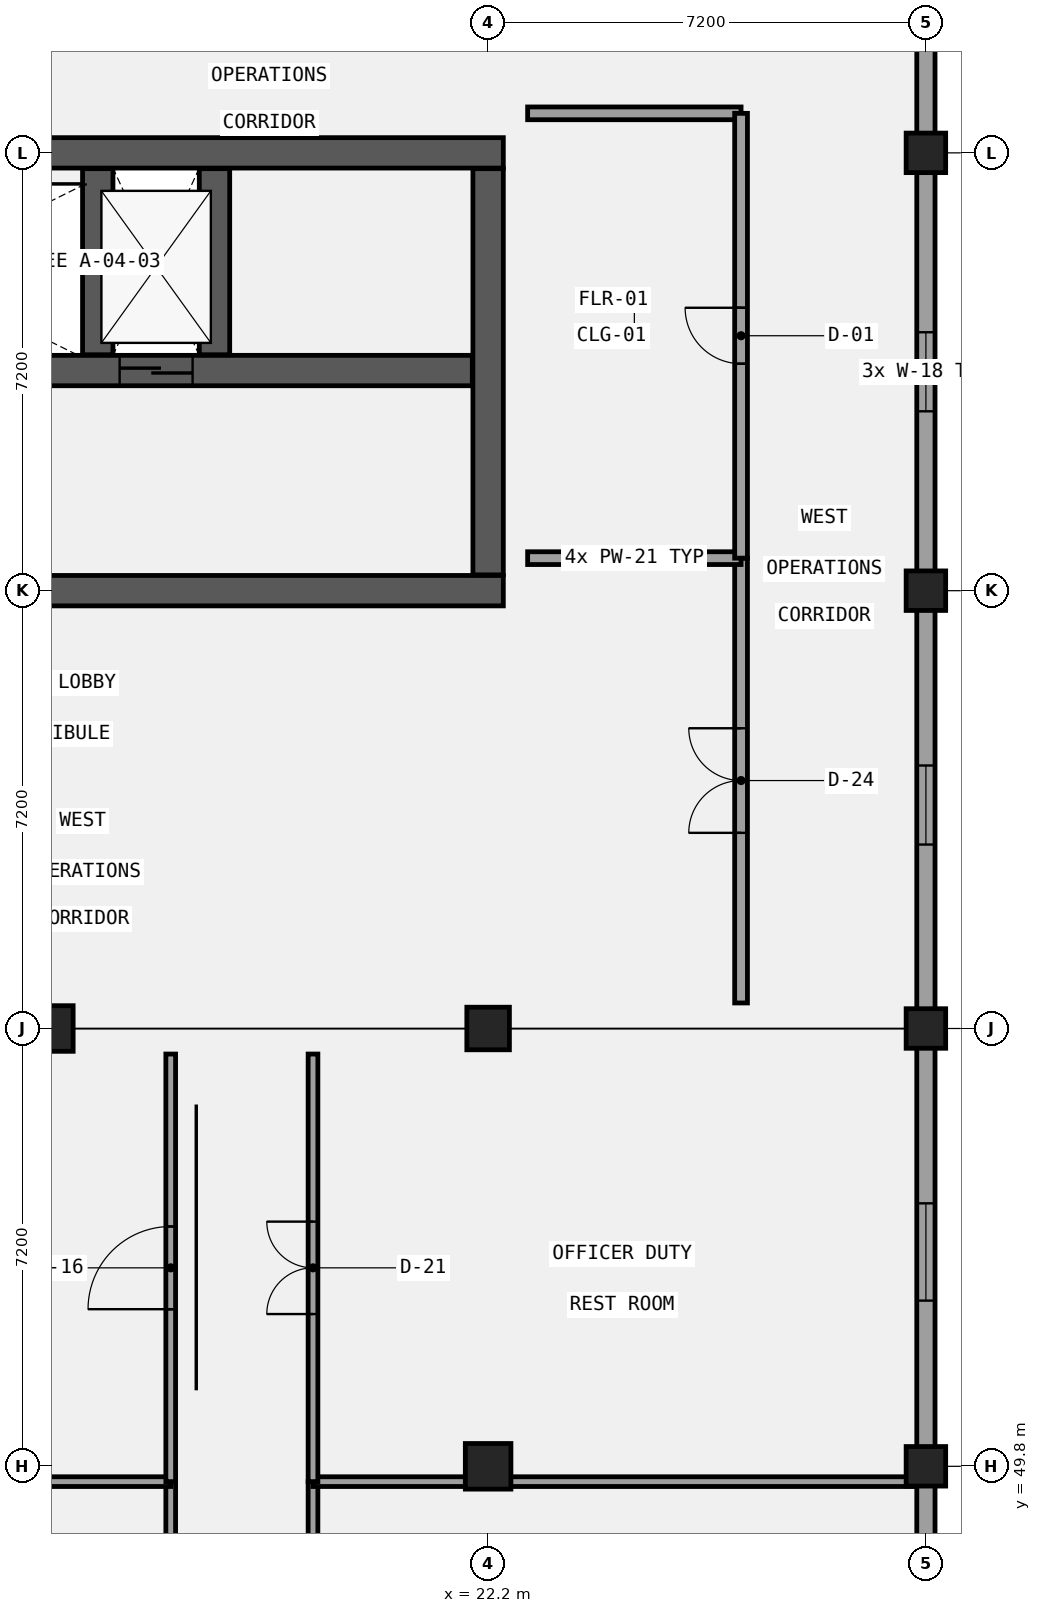
"""IFC4 building model, lengths in metres.
Left out: names, types, materials, properties, quantities, classifications, styles, units other than length and angle.
Written with IfcOpenShell. Run it as: python <this file> out.ifc"""

import sys

from ifc_helpers import new_model, si_unit, direction, frame, frame_2d, origin, origin_2d, place, context, subcontext, project, spatial, rectangle, circle, extrude, element, fill, save


model = new_model("IFC4")
c1 = context("Model", 3, precision=1e-05, world=origin(), true_north=direction((0.0, 1.0)))
c2 = subcontext(c1, "Body", "Model", "MODEL_VIEW")
j1 = project(units=[si_unit("LENGTHUNIT", "METRE"), si_unit("PLANEANGLEUNIT", "RADIAN")], contexts=[c1])
p1 = place(None, origin())
s1 = spatial("IfcSite", under=j1, at=p1, CompositionType="ELEMENT")
p2 = place(p1, origin())
s2 = spatial("IfcBuilding", under=s1, at=p2, CompositionType="ELEMENT")
p3 = place(p2, frame((0.0, 0.0, 5.4)))
s3 = spatial("IfcBuildingStorey", under=s2, at=p3, CompositionType="ELEMENT", Elevation=5.4)
p4 = place(p3, frame((7.55, 71.4, 0.0), z_axis=(0.0, 0.0, 1.0), x_axis=(1.0, 0.0, 0.0)))
e1 = element("IfcWall", 1, at=p4, inside=s3, PredefinedType="SHEAR", context=c2, shape_type="SweptSolid", body=[
    extrude(rectangle(XDim=14.9, YDim=0.5, at=frame_2d((7.45, 0.0))), origin(), (0.0, 0.0, 1.0), 4.2),
])
p5 = place(p3, frame((7.55, 64.2, 0.0), z_axis=(0.0, 0.0, 1.0), x_axis=(1.0, 0.0, 0.0)))
e2 = element("IfcWall", 2, at=p5, inside=s3, PredefinedType="SHEAR", context=c2, shape_type="SweptSolid", body=[
    extrude(rectangle(XDim=14.9, YDim=0.5, at=frame_2d((7.45, 0.0))), origin(), (0.0, 0.0, 1.0), 4.2),
])
p6 = place(p5, frame((3.8, 0.0, 0.0)))
e3 = element("IfcOpeningElement", 3, at=p6, cuts=e2, PredefinedType="OPENING", context=c2, shape_type="SweptSolid", body=[
    extrude(rectangle(XDim=1.3, YDim=2.2, at=frame_2d((0.65, 1.1))), frame((0.0, 0.26, 0.0), z_axis=(0.0, -1.0, 0.0), x_axis=(1.0, 0.0, 0.0)), (0.0, 0.0, 1.0), 0.52),
])
p7 = place(p3, frame((22.2, 64.46, 0.0), z_axis=(0.0, 0.0, 1.0), x_axis=(0.0, 1.0, 0.0)))
e4 = element("IfcWall", 4, at=p7, inside=s3, PredefinedType="SHEAR", context=c2, shape_type="SweptSolid", body=[
    extrude(rectangle(XDim=6.68, YDim=0.5, at=frame_2d((3.34, 0.0))), origin(), (0.0, 0.0, 1.0), 4.2),
])
p8 = place(p3, frame((8.06, 67.82, 0.0), z_axis=(0.0, 0.0, 1.0), x_axis=(1.0, 0.0, 0.0)))
e5 = element("IfcWall", 5, at=p8, inside=s3, PredefinedType="SHEAR", context=c2, shape_type="SweptSolid", body=[
    extrude(rectangle(XDim=13.88, YDim=0.5, at=frame_2d((6.94, 0.0))), origin(), (0.0, 0.0, 1.0), 4.2),
])
p9 = place(p8, frame((8.08, 0.0, 0.0)))
e6 = element("IfcOpeningElement", 6, at=p9, cuts=e5, PredefinedType="OPENING", context=c2, shape_type="SweptSolid", body=[
    extrude(rectangle(XDim=1.2, YDim=2.15, at=frame_2d((0.6, 1.075))), frame((0.0, 0.26, 0.0), z_axis=(0.0, -1.0, 0.0), x_axis=(1.0, 0.0, 0.0)), (0.0, 0.0, 1.0), 0.52),
])
p10 = place(p8, frame((0.315, 0.0, 0.0)))
e7 = element("IfcOpeningElement", 7, at=p10, cuts=e5, PredefinedType="OPENING", context=c2, shape_type="SweptSolid", body=[
    extrude(rectangle(XDim=1.15, YDim=2.15, at=frame_2d((0.575, 1.075))), frame((0.0, 0.26, 0.0), z_axis=(0.0, -1.0, 0.0), x_axis=(1.0, 0.0, 0.0)), (0.0, 0.0, 1.0), 0.52),
])
for number, where, z_axis, x_axis in (
    (8, (15.78, 68.08, 0.0), (0.0, 0.0, 1.0), (0.0, 1.0, 0.0)),
    (9, (17.7, 68.08, 0.0), (0.0, 0.0, 1.0), (0.0, 1.0, 0.0)),
):
    element("IfcWall", number, at=place(p3, frame(where, z_axis=z_axis, x_axis=x_axis)), inside=s3, PredefinedType="SHEAR", context=c2, shape_type="SweptSolid", body=[
        extrude(rectangle(XDim=3.06, YDim=0.5, at=frame_2d((1.53, 0.0))), origin(), (0.0, 0.0, 1.0), 4.2),
    ])
for number, where, z_axis, x_axis in (
    (10, (15.0, 57.0, 0.0), (0.0, 0.0, 1.0), (1.0, 0.0, 0.0)),
    (11, (22.2, 49.8, 0.0), (0.0, 0.0, 1.0), (1.0, 0.0, 0.0)),
):
    element("IfcColumn", number, at=place(p3, frame(where, z_axis=z_axis, x_axis=x_axis)), inside=s3, PredefinedType="COLUMN", context=c2, shape_type="SweptSolid", body=[
        extrude(rectangle(XDim=0.75, YDim=0.75, at=origin_2d()), origin(), (0.0, 0.0, 1.0), 4.2),
    ])
p11 = place(p3, frame((22.2, 57.0, 0.0), z_axis=(0.0, 0.0, 1.0), x_axis=(1.0, 0.0, 0.0)))
e12 = element("IfcColumn", 12, at=p11, inside=s3, PredefinedType="COLUMN", context=c2, shape_type="SweptSolid", body=[
    extrude(rectangle(XDim=0.7, YDim=0.7, at=origin_2d()), origin(), (0.0, 0.0, 1.0), 4.2),
])
for number, where, z_axis, x_axis in (
    (13, (29.4, 49.8, 0.0), (0.0, 0.0, 1.0), (1.0, 0.0, 0.0)),
    (14, (29.4, 57.0, 0.0), (0.0, 0.0, 1.0), (1.0, 0.0, 0.0)),
    (15, (29.4, 64.2, 0.0), (0.0, 0.0, 1.0), (1.0, 0.0, 0.0)),
    (16, (29.4, 71.4, 0.0), (0.0, 0.0, 1.0), (1.0, 0.0, 0.0)),
):
    element("IfcColumn", number, at=place(p3, frame(where, z_axis=z_axis, x_axis=x_axis)), inside=s3, PredefinedType="COLUMN", context=c2, shape_type="SweptSolid", body=[
        extrude(circle(Radius=0.325, at=origin_2d()), origin(), (0.0, 0.0, 1.0), 4.2),
    ])
p12 = place(p3, frame((29.4, 35.55, 0.0), z_axis=(0.0, 0.0, 1.0), x_axis=(0.0, 1.0, 0.0)))
e17 = element("IfcWall", 17, at=p12, inside=s3, PredefinedType="SOLIDWALL", context=c2, shape_type="SweptSolid", body=[
    extrude(rectangle(XDim=21.3, YDim=0.3, at=frame_2d((10.65, 0.0))), origin(), (0.0, 0.0, 1.0), 2.92),
])
p13 = place(p12, frame((2.725, 0.0, 1.0)))
e18 = element("IfcOpeningElement", 18, at=p13, cuts=e17, PredefinedType="OPENING", context=c2, shape_type="SweptSolid", body=[
    extrude(rectangle(XDim=1.6, YDim=1.4, at=frame_2d((0.8, 0.7))), frame((0.0, 0.16, 0.0), z_axis=(0.0, -1.0, 0.0), x_axis=(1.0, 0.0, 0.0)), (0.0, 0.0, 1.0), 0.32),
])
p14 = place(p12, frame((9.85, 0.0, 1.0)))
e19 = element("IfcOpeningElement", 19, at=p14, cuts=e17, PredefinedType="OPENING", context=c2, shape_type="SweptSolid", body=[
    extrude(rectangle(XDim=1.6, YDim=1.4, at=frame_2d((0.8, 0.7))), frame((0.0, 0.16, 0.0), z_axis=(0.0, -1.0, 0.0), x_axis=(1.0, 0.0, 0.0)), (0.0, 0.0, 1.0), 0.32),
])
p15 = place(p12, frame((16.975, 0.0, 1.0)))
e20 = element("IfcOpeningElement", 20, at=p15, cuts=e17, PredefinedType="OPENING", context=c2, shape_type="SweptSolid", body=[
    extrude(rectangle(XDim=1.6, YDim=1.4, at=frame_2d((0.8, 0.7))), frame((0.0, 0.16, 0.0), z_axis=(0.0, -1.0, 0.0), x_axis=(1.0, 0.0, 0.0)), (0.0, 0.0, 1.0), 0.32),
])
p16 = place(p3, frame((29.4, 57.15, 0.0), z_axis=(0.0, 0.0, 1.0), x_axis=(0.0, 1.0, 0.0)))
e21 = element("IfcWall", 21, at=p16, inside=s3, PredefinedType="SOLIDWALL", context=c2, shape_type="SweptSolid", body=[
    extrude(rectangle(XDim=21.3, YDim=0.3, at=frame_2d((10.65, 0.0))), origin(), (0.0, 0.0, 1.0), 3.27),
])
p17 = place(p16, frame((2.875, 0.0, 1.0)))
e22 = element("IfcOpeningElement", 22, at=p17, cuts=e21, PredefinedType="OPENING", context=c2, shape_type="SweptSolid", body=[
    extrude(rectangle(XDim=1.3, YDim=1.9, at=frame_2d((0.65, 0.95))), frame((0.0, 0.16, 0.0), z_axis=(0.0, -1.0, 0.0), x_axis=(1.0, 0.0, 0.0)), (0.0, 0.0, 1.0), 0.32),
])
p18 = place(p16, frame((10.0, 0.0, 1.0)))
e23 = element("IfcOpeningElement", 23, at=p18, cuts=e21, PredefinedType="OPENING", context=c2, shape_type="SweptSolid", body=[
    extrude(rectangle(XDim=1.3, YDim=1.9, at=frame_2d((0.65, 0.95))), frame((0.0, 0.16, 0.0), z_axis=(0.0, -1.0, 0.0), x_axis=(1.0, 0.0, 0.0)), (0.0, 0.0, 1.0), 0.32),
])
p19 = place(p16, frame((17.125, 0.0, 1.0)))
e24 = element("IfcOpeningElement", 24, at=p19, cuts=e21, PredefinedType="OPENING", context=c2, shape_type="SweptSolid", body=[
    extrude(rectangle(XDim=1.3, YDim=1.9, at=frame_2d((0.65, 0.95))), frame((0.0, 0.16, 0.0), z_axis=(0.0, -1.0, 0.0), x_axis=(1.0, 0.0, 0.0)), (0.0, 0.0, 1.0), 0.32),
])
p20 = place(p3, frame((16.98, 42.516, 0.0), z_axis=(0.0, 0.0, 1.0), x_axis=(0.0, 1.0, 0.0)))
e25 = element("IfcWall", 25, at=p20, inside=s3, PredefinedType="PARTITIONING", context=c2, shape_type="SweptSolid", body=[
    extrude(rectangle(XDim=7.032, YDim=0.16, at=frame_2d((3.516, 0.0))), origin(), (0.0, 0.0, 1.0), 3.92),
])
p21 = place(p20, frame((2.906, 0.0, 0.0)))
e26 = element("IfcOpeningElement", 26, at=p21, cuts=e25, PredefinedType="OPENING", context=c2, shape_type="SweptSolid", body=[
    extrude(rectangle(XDim=1.22, YDim=2.35, at=frame_2d((0.61, 1.175))), frame((0.0, 0.09, 0.0), z_axis=(0.0, -1.0, 0.0), x_axis=(1.0, 0.0, 0.0)), (0.0, 0.0, 1.0), 0.18),
])
p22 = place(p3, frame((7.98, 49.548, 0.0), z_axis=(0.0, 0.0, 1.0), x_axis=(1.0, 0.0, 0.0)))
e27 = element("IfcWall", 27, at=p22, inside=s3, PredefinedType="PARTITIONING", context=c2, shape_type="SweptSolid", body=[
    extrude(rectangle(XDim=9.0, YDim=0.16, at=frame_2d((4.5, 0.0))), origin(), (0.0, 0.0, 1.0), 2.72),
])
p23 = place(p3, frame((16.98, 49.548, 0.0), z_axis=(0.0, 0.0, 1.0), x_axis=(0.0, 1.0, 0.0)))
e28 = element("IfcWall", 28, at=p23, inside=s3, PredefinedType="PARTITIONING", context=c2, shape_type="SweptSolid", body=[
    extrude(rectangle(XDim=7.032, YDim=0.16, at=frame_2d((3.516, 0.0))), origin(), (0.0, 0.0, 1.0), 3.92),
])
p24 = place(p23, frame((2.836, 0.0, 0.0)))
e29 = element("IfcOpeningElement", 29, at=p24, cuts=e28, PredefinedType="OPENING", context=c2, shape_type="SweptSolid", body=[
    extrude(rectangle(XDim=1.36, YDim=2.1, at=frame_2d((0.68, 1.05))), frame((0.0, 0.09, 0.0), z_axis=(0.0, -1.0, 0.0), x_axis=(1.0, 0.0, 0.0)), (0.0, 0.0, 1.0), 0.18),
])
p25 = place(p3, frame((19.32, 42.516, 0.0), z_axis=(0.0, 0.0, 1.0), x_axis=(0.0, 1.0, 0.0)))
e30 = element("IfcWall", 30, at=p25, inside=s3, PredefinedType="PARTITIONING", context=c2, shape_type="SweptSolid", body=[
    extrude(rectangle(XDim=7.032, YDim=0.16, at=frame_2d((3.516, 0.0))), origin(), (0.0, 0.0, 1.0), 3.92),
])
p26 = place(p25, frame((2.756, 0.0, 0.0)))
e31 = element("IfcOpeningElement", 31, at=p26, cuts=e30, PredefinedType="OPENING", context=c2, shape_type="SweptSolid", body=[
    extrude(rectangle(XDim=1.52, YDim=2.22, at=frame_2d((0.76, 1.11))), frame((0.0, 0.09, 0.0), z_axis=(0.0, -1.0, 0.0), x_axis=(1.0, 0.0, 0.0)), (0.0, 0.0, 1.0), 0.18),
])
p27 = place(p3, frame((19.32, 49.548, 0.0), z_axis=(0.0, 0.0, 1.0), x_axis=(1.0, 0.0, 0.0)))
e32 = element("IfcWall", 32, at=p27, inside=s3, PredefinedType="PARTITIONING", context=c2, shape_type="SweptSolid", body=[
    extrude(rectangle(XDim=9.9, YDim=0.16, at=frame_2d((4.95, 0.0))), origin(), (0.0, 0.0, 1.0), 2.72),
])
p28 = place(p3, frame((19.32, 49.548, 0.0), z_axis=(0.0, 0.0, 1.0), x_axis=(0.0, 1.0, 0.0)))
e33 = element("IfcWall", 33, at=p28, inside=s3, PredefinedType="PARTITIONING", context=c2, shape_type="SweptSolid", body=[
    extrude(rectangle(XDim=7.032, YDim=0.16, at=frame_2d((3.516, 0.0))), origin(), (0.0, 0.0, 1.0), 3.92),
])
p29 = place(p28, frame((2.756, 0.0, 0.0)))
e34 = element("IfcOpeningElement", 34, at=p29, cuts=e33, PredefinedType="OPENING", context=c2, shape_type="SweptSolid", body=[
    extrude(rectangle(XDim=1.52, YDim=2.35, at=frame_2d((0.76, 1.175))), frame((0.0, 0.09, 0.0), z_axis=(0.0, -1.0, 0.0), x_axis=(1.0, 0.0, 0.0)), (0.0, 0.0, 1.0), 0.18),
])
p30 = place(p3, frame((22.85, 72.05, 0.0), z_axis=(0.0, 0.0, 1.0), x_axis=(1.0, 0.0, 0.0)))
e35 = element("IfcWall", 35, at=p30, inside=s3, PredefinedType="PARTITIONING", context=c2, shape_type="SweptSolid", body=[
    extrude(rectangle(XDim=3.51, YDim=0.21, at=frame_2d((1.755, 0.0))), origin(), (0.0, 0.0, 1.0), 3.92),
])
p31 = place(p3, frame((26.36, 57.42, 0.0), z_axis=(0.0, 0.0, 1.0), x_axis=(0.0, 1.0, 0.0)))
e36 = element("IfcWall", 36, at=p31, inside=s3, PredefinedType="PARTITIONING", context=c2, shape_type="SweptSolid", body=[
    extrude(rectangle(XDim=7.315, YDim=0.21, at=frame_2d((3.658, 0.0))), origin(), (0.0, 0.0, 1.0), 3.92),
])
p32 = place(p31, frame((2.798, 0.0, 0.0)))
e37 = element("IfcOpeningElement", 37, at=p32, cuts=e36, PredefinedType="OPENING", context=c2, shape_type="SweptSolid", body=[
    extrude(rectangle(XDim=1.72, YDim=2.35, at=frame_2d((0.86, 1.175))), frame((0.0, 0.115, 0.0), z_axis=(0.0, -1.0, 0.0), x_axis=(1.0, 0.0, 0.0)), (0.0, 0.0, 1.0), 0.23),
])
p33 = place(p3, frame((22.85, 64.735, 0.0), z_axis=(0.0, 0.0, 1.0), x_axis=(1.0, 0.0, 0.0)))
e38 = element("IfcWall", 38, at=p33, inside=s3, PredefinedType="PARTITIONING", context=c2, shape_type="SweptSolid", body=[
    extrude(rectangle(XDim=3.51, YDim=0.21, at=frame_2d((1.755, 0.0))), origin(), (0.0, 0.0, 1.0), 3.92),
])
p34 = place(p3, frame((26.36, 64.735, 0.0), z_axis=(0.0, 0.0, 1.0), x_axis=(0.0, 1.0, 0.0)))
e39 = element("IfcWall", 39, at=p34, inside=s3, PredefinedType="PARTITIONING", context=c2, shape_type="SweptSolid", body=[
    extrude(rectangle(XDim=7.315, YDim=0.21, at=frame_2d((3.657, 0.0))), origin(), (0.0, 0.0, 1.0), 3.92),
])
p35 = place(p34, frame((3.198, 0.0, 0.0)))
e40 = element("IfcOpeningElement", 40, at=p35, cuts=e39, PredefinedType="OPENING", context=c2, shape_type="SweptSolid", body=[
    extrude(rectangle(XDim=0.92, YDim=2.1, at=frame_2d((0.46, 1.05))), frame((0.0, 0.115, 0.0), z_axis=(0.0, -1.0, 0.0), x_axis=(1.0, 0.0, 0.0)), (0.0, 0.0, 1.0), 0.23),
])
p36 = place(p9, frame((1.2, 0.0, 0.0), z_axis=(0.0, 0.0, 1.0), x_axis=(-1.0, 0.0, 0.0)))
e41 = element("IfcDoor", 41, at=p36, inside=s3, OperationType="DOUBLE_DOOR_SLIDING", PredefinedType="DOOR", context=c2, shape_type="SweptSolid", body=[
    extrude(rectangle(XDim=1.2, YDim=2.15, at=frame_2d((0.6, 1.075))), frame((0.0, 0.025, 0.0), z_axis=(0.0, -1.0, 0.0), x_axis=(1.0, 0.0, 0.0)), (0.0, 0.0, 1.0), 0.05),
])
fill(e6, e41)
p37 = place(p15, origin())
e42 = element("IfcWindow", 42, at=p37, inside=s3, PartitioningType="SINGLE_PANEL", PredefinedType="WINDOW", context=c2, shape_type="SweptSolid", body=[
    extrude(rectangle(XDim=1.6, YDim=1.4, at=frame_2d((0.8, 0.7))), frame((0.0, 0.03, 0.0), z_axis=(0.0, -1.0, 0.0), x_axis=(1.0, 0.0, 0.0)), (0.0, 0.0, 1.0), 0.06),
])
fill(e20, e42)
p38 = place(p17, origin())
e43 = element("IfcWindow", 43, at=p38, inside=s3, PartitioningType="SINGLE_PANEL", PredefinedType="WINDOW", context=c2, shape_type="SweptSolid", body=[
    extrude(rectangle(XDim=1.3, YDim=1.9, at=frame_2d((0.65, 0.95))), frame((0.0, 0.03, 0.0), z_axis=(0.0, -1.0, 0.0), x_axis=(1.0, 0.0, 0.0)), (0.0, 0.0, 1.0), 0.06),
])
fill(e22, e43)
p39 = place(p18, origin())
e44 = element("IfcWindow", 44, at=p39, inside=s3, PartitioningType="SINGLE_PANEL", PredefinedType="WINDOW", context=c2, shape_type="SweptSolid", body=[
    extrude(rectangle(XDim=1.3, YDim=1.9, at=frame_2d((0.65, 0.95))), frame((0.0, 0.03, 0.0), z_axis=(0.0, -1.0, 0.0), x_axis=(1.0, 0.0, 0.0)), (0.0, 0.0, 1.0), 0.06),
])
fill(e23, e44)
p40 = place(p24, frame((1.36, 0.0, 0.0), z_axis=(0.0, 0.0, 1.0), x_axis=(-1.0, 0.0, 0.0)))
e45 = element("IfcDoor", 45, at=p40, inside=s3, OperationType="SINGLE_SWING_LEFT", PredefinedType="DOOR", context=c2, shape_type="SweptSolid", body=[
    extrude(rectangle(XDim=1.36, YDim=2.1, at=frame_2d((0.68, 1.05))), frame((0.0, 0.025, 0.0), z_axis=(0.0, -1.0, 0.0), x_axis=(1.0, 0.0, 0.0)), (0.0, 0.0, 1.0), 0.05),
])
fill(e29, e45)
p41 = place(p29, origin())
e46 = element("IfcDoor", 46, at=p41, inside=s3, OperationType="DOUBLE_DOOR_SINGLE_SWING", PredefinedType="DOOR", context=c2, shape_type="SweptSolid", body=[
    extrude(rectangle(XDim=1.52, YDim=2.35, at=frame_2d((0.76, 1.175))), frame((0.0, 0.025, 0.0), z_axis=(0.0, -1.0, 0.0), x_axis=(1.0, 0.0, 0.0)), (0.0, 0.0, 1.0), 0.05),
])
fill(e34, e46)
p42 = place(p32, frame((1.72, 0.0, 0.0), z_axis=(0.0, 0.0, 1.0), x_axis=(-1.0, 0.0, 0.0)))
e47 = element("IfcDoor", 47, at=p42, inside=s3, OperationType="DOUBLE_DOOR_SINGLE_SWING", PredefinedType="DOOR", context=c2, shape_type="SweptSolid", body=[
    extrude(rectangle(XDim=1.72, YDim=2.35, at=frame_2d((0.86, 1.175))), frame((0.0, 0.025, 0.0), z_axis=(0.0, -1.0, 0.0), x_axis=(1.0, 0.0, 0.0)), (0.0, 0.0, 1.0), 0.05),
])
fill(e37, e47)
p43 = place(p35, frame((0.92, 0.0, 0.0), z_axis=(0.0, 0.0, 1.0), x_axis=(-1.0, 0.0, 0.0)))
e48 = element("IfcDoor", 48, at=p43, inside=s3, OperationType="SINGLE_SWING_RIGHT", PredefinedType="DOOR", context=c2, shape_type="SweptSolid", body=[
    extrude(rectangle(XDim=0.92, YDim=2.1, at=frame_2d((0.46, 1.05))), frame((0.0, 0.025, 0.0), z_axis=(0.0, -1.0, 0.0), x_axis=(1.0, 0.0, 0.0)), (0.0, 0.0, 1.0), 0.05),
])
fill(e40, e48)
save(model, sys.argv[1])
